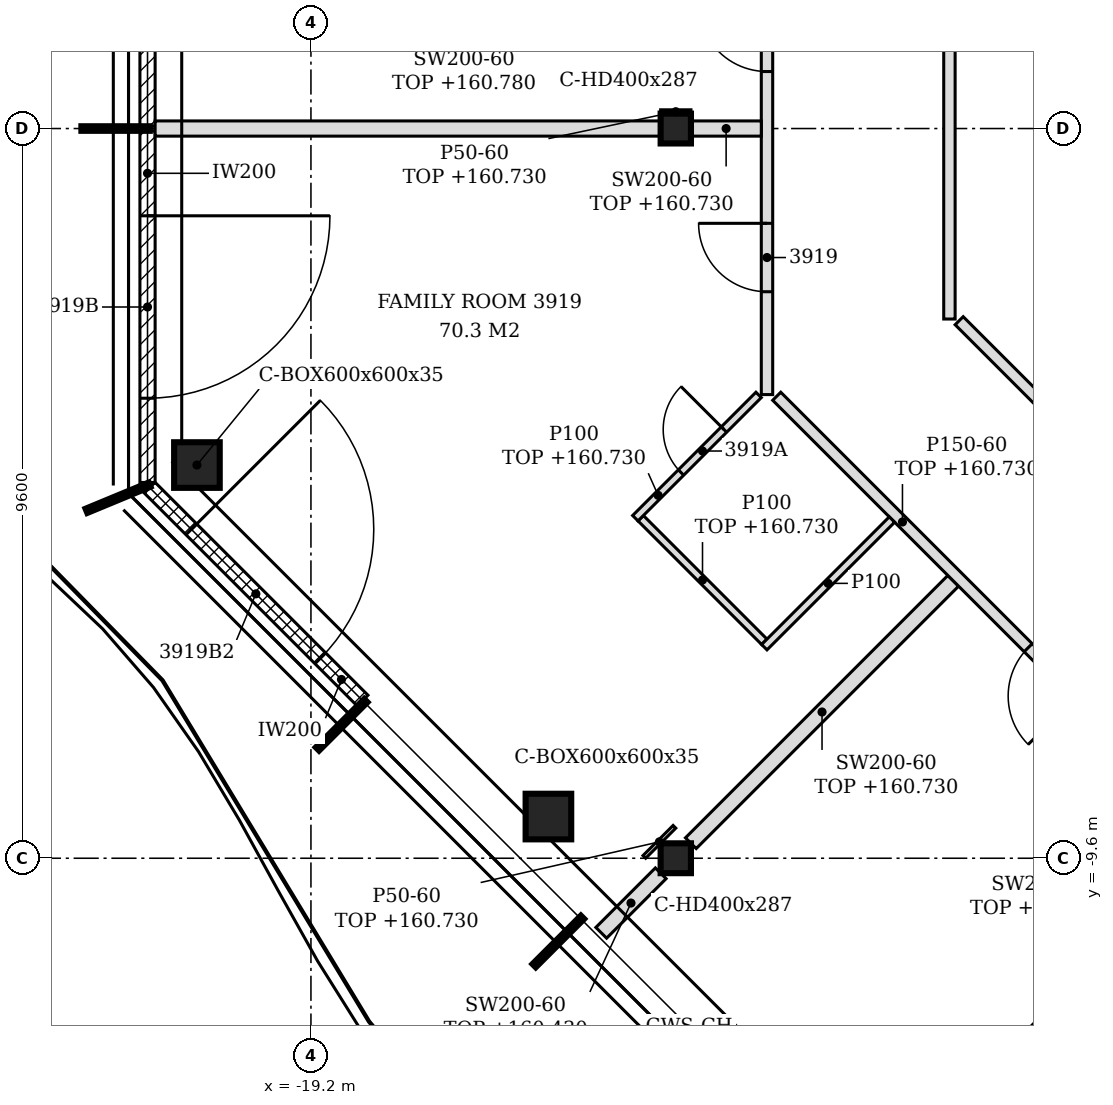
"""IFC4 building model, lengths in metres.
Left out: names, types, materials, properties, quantities, classifications, styles, units other than length and angle.
Written with IfcOpenShell. Run it as: python <this file> out.ifc"""

import sys

from ifc_helpers import new_model, si_unit, direction, frame, frame_2d, origin, origin_2d, place, context, subcontext, project, spatial, polyline, rectangle, hollow_rectangle, i_section, outline, extrude, element, fill, save


model = new_model("IFC4")
c1 = context("Model", 3, precision=1e-05, world=origin(), true_north=direction((0.0, 1.0)))
c2 = subcontext(c1, "Body", "Model", "MODEL_VIEW")
j1 = project(units=[si_unit("LENGTHUNIT", "METRE"), si_unit("PLANEANGLEUNIT", "RADIAN")], contexts=[c1])
p1 = place(None, origin())
s1 = spatial("IfcSite", under=j1, at=p1, CompositionType="ELEMENT")
p2 = place(p1, origin())
s2 = spatial("IfcBuilding", under=s1, at=p2, CompositionType="ELEMENT")
p3 = place(p2, frame((0.0, 0.0, 157.8)))
s3 = spatial("IfcBuildingStorey", under=s2, at=p3, CompositionType="ELEMENT", Elevation=157.8)
for number, where, z_axis, x_axis in (
    (1, (-20.7, -4.427, -0.15), (0.0, 0.0, 1.0), (1.0, 0.0, 0.0)),
    (2, (-16.076, -9.052, -0.15), (0.0, 0.0, 1.0), (1.0, 0.0, 0.0)),
):
    element("IfcColumn", number, at=place(p3, frame(where, z_axis=z_axis, x_axis=x_axis)), inside=s3, PredefinedType="COLUMN", context=c2, shape_type="SweptSolid", body=[
        extrude(hollow_rectangle(XDim=0.6, YDim=0.6, WallThickness=0.035, at=origin_2d()), origin(), (0.0, 0.0, 1.0), 3.6),
    ])
for number, where, z_axis, x_axis in (
    (3, (-14.4, -9.6, -0.15), (0.0, 0.0, 1.0), (1.0, 0.0, 0.0)),
    (4, (-14.4, 0.0, -0.15), (0.0, 0.0, 1.0), (1.0, 0.0, 0.0)),
):
    element("IfcColumn", number, at=place(p3, frame(where, z_axis=z_axis, x_axis=x_axis)), inside=s3, PredefinedType="COLUMN", context=c2, shape_type="SweptSolid", body=[
        extrude(i_section(OverallWidth=0.399, OverallDepth=0.393, WebThickness=0.023, FlangeThickness=0.037, FilletRadius=0.015, at=origin_2d()), origin(), (0.0, 0.0, 1.0), 3.6),
    ])
p4 = place(p3, frame((-21.35, 4.77, 0.0), z_axis=(0.0, 0.0, 1.0), x_axis=(0.0, -1.0, 0.0)))
e5 = element("IfcWall", 5, at=p4, inside=s3, PredefinedType="NOTDEFINED", context=c2, shape_type="SweptSolid", body=[
    extrude(rectangle(XDim=4.74, YDim=0.2, at=frame_2d((2.37, 0.0))), origin(), (0.0, 0.0, 1.0), 3.45),
])
p5 = place(p4, frame((1.17, 0.0, 0.0)))
e6 = element("IfcOpeningElement", 6, at=p5, cuts=e5, PredefinedType="OPENING", context=c2, shape_type="SweptSolid", body=[
    extrude(rectangle(XDim=2.4, YDim=2.4, at=frame_2d((1.2, 1.2))), frame((0.0, 0.11, 0.0), z_axis=(0.0, -1.0, 0.0), x_axis=(1.0, 0.0, 0.0)), (0.0, 0.0, 1.0), 0.22),
])
p6 = place(p3, frame((-21.35, -0.03, 0.0), z_axis=(0.0, 0.0, 1.0), x_axis=(0.0, -1.0, 0.0)))
e7 = element("IfcWall", 7, at=p6, inside=s3, PredefinedType="NOTDEFINED", context=c2, shape_type="SweptSolid", body=[
    extrude(rectangle(XDim=4.626, YDim=0.2, at=frame_2d((2.313, 0.0))), origin(), (0.0, 0.0, 1.0), 3.45),
])
p7 = place(p6, frame((1.118, 0.0, 0.0)))
e8 = element("IfcOpeningElement", 8, at=p7, cuts=e7, PredefinedType="OPENING", context=c2, shape_type="SweptSolid", body=[
    extrude(rectangle(XDim=2.4, YDim=2.4, at=frame_2d((1.2, 1.2))), frame((0.0, 0.11, 0.0), z_axis=(0.0, -1.0, 0.0), x_axis=(1.0, 0.0, 0.0)), (0.0, 0.0, 1.0), 0.22),
])
p8 = place(p3, frame((-21.322, -4.725, 0.0), z_axis=(0.0, 0.0, 1.0), x_axis=(0.707106781187, -0.707106781187, 0.0)))
e9 = element("IfcWall", 9, at=p8, inside=s3, PredefinedType="NOTDEFINED", context=c2, shape_type="SweptSolid", body=[
    extrude(rectangle(XDim=3.962, YDim=0.2, at=frame_2d((1.981, 0.0))), origin(), (0.0, 0.0, 1.0), 3.45),
])
p9 = place(p8, frame((0.775, 0.0, 0.0)))
e10 = element("IfcOpeningElement", 10, at=p9, cuts=e9, PredefinedType="OPENING", context=c2, shape_type="SweptSolid", body=[
    extrude(rectangle(XDim=2.4, YDim=2.4, at=frame_2d((1.2, 1.2))), frame((0.0, 0.11, 0.0), z_axis=(0.0, -1.0, 0.0), x_axis=(1.0, 0.0, 0.0)), (0.0, 0.0, 1.0), 0.22),
])
p10 = place(p3, frame((-11.152, -13.375, 0.0), z_axis=(0.0, 0.0, 1.0), x_axis=(0.707106781187, 0.707106781187, 0.0)))
e11 = element("IfcWall", 11, at=p10, inside=s3, PredefinedType="PARTITIONING", context=c2, shape_type="SweptSolid", body=[
    extrude(rectangle(XDim=6.83, YDim=0.2, at=frame_2d((3.415, 0.0))), origin(), (0.0, 0.0, 1.0), 2.93),
])
p11 = place(p3, frame((-15.381, -10.581, 0.0), z_axis=(0.0, 0.0, 1.0), x_axis=(0.707217034054, 0.706996511125, 0.0)))
e12 = element("IfcWall", 12, at=p11, inside=s3, PredefinedType="PARTITIONING", context=c2, shape_type="SweptSolid", body=[
    extrude(rectangle(XDim=1.107, YDim=0.2, at=frame_2d((0.554, 0.0))), origin(), (0.0, 0.0, 1.0), 2.63),
])
p12 = place(p3, frame((-14.202, -9.402, 0.0), z_axis=(0.0, 0.0, 1.0), x_axis=(0.707081776084, 0.707131785404, 0.0)))
e13 = element("IfcWall", 13, at=p12, inside=s3, PredefinedType="PARTITIONING", context=c2, shape_type="SweptSolid", body=[
    extrude(rectangle(XDim=4.882, YDim=0.2, at=frame_2d((2.441, 0.0))), origin(), (0.0, 0.0, 1.0), 2.93),
])
p13 = place(p3, frame((-8.322, -8.272, 0.0), z_axis=(0.0, 0.0, 1.0), x_axis=(-0.707106781187, 0.707106781187, 0.0)))
e14 = element("IfcWall", 14, at=p13, inside=s3, PredefinedType="PARTITIONING", context=c2, shape_type="SweptSolid", body=[
    extrude(rectangle(XDim=6.718, YDim=0.15, at=frame_2d((3.359, 0.0))), origin(), (0.0, 0.0, 1.0), 2.93),
])
p14 = place(p13, frame((1.139, 0.0, 0.0)))
e15 = element("IfcOpeningElement", 15, at=p14, cuts=e14, PredefinedType="OPENING", context=c2, shape_type="SweptSolid", body=[
    extrude(rectangle(XDim=0.9, YDim=2.1, at=frame_2d((0.45, 1.05))), frame((0.0, 0.085, 0.0), z_axis=(0.0, -1.0, 0.0), x_axis=(1.0, 0.0, 0.0)), (0.0, 0.0, 1.0), 0.17),
])
p15 = place(p3, frame((-13.235, -6.753, 0.0), z_axis=(0.0, 0.0, 1.0), x_axis=(-0.707106781187, 0.707106781187, 0.0)))
e16 = element("IfcWall", 16, at=p15, inside=s3, PredefinedType="PARTITIONING", context=c2, shape_type="SweptSolid", body=[
    extrude(rectangle(XDim=2.3, YDim=0.1, at=frame_2d((1.15, 0.0))), origin(), (0.0, 0.0, 1.0), 2.93),
])
p16 = place(p3, frame((-13.235, -6.823, 0.0), z_axis=(0.0, 0.0, 1.0), x_axis=(0.707106781187, 0.707106781187, 0.0)))
e17 = element("IfcWall", 17, at=p16, inside=s3, PredefinedType="PARTITIONING", context=c2, shape_type="SweptSolid", body=[
    extrude(rectangle(XDim=2.375, YDim=0.1, at=frame_2d((1.188, 0.0))), origin(), (0.0, 0.0, 1.0), 3.45),
])
p17 = place(p3, frame((-7.328, -5.872, 0.0), z_axis=(0.0, 0.0, 1.0), x_axis=(-0.707106781187, 0.707106781187, 0.0)))
e18 = element("IfcWall", 18, at=p17, inside=s3, PredefinedType="PARTITIONING", context=c2, shape_type="SweptSolid", body=[
    extrude(rectangle(XDim=4.729, YDim=0.15, at=frame_2d((2.365, 0.0))), origin(), (0.0, 0.0, 1.0), 2.93),
])
p18 = place(p3, frame((-14.932, -5.126, 0.0), z_axis=(0.0, 0.0, 1.0), x_axis=(0.707106781187, 0.707106781187, 0.0)))
e19 = element("IfcWall", 19, at=p18, inside=s3, PredefinedType="PARTITIONING", context=c2, shape_type="SweptSolid", body=[
    extrude(rectangle(XDim=2.294, YDim=0.1, at=frame_2d((1.147, 0.0))), origin(), (0.0, 0.0, 1.0), 2.93),
])
p19 = place(p18, frame((0.85, 0.0, 0.0)))
e20 = element("IfcOpeningElement", 20, at=p19, cuts=e19, PredefinedType="OPENING", context=c2, shape_type="SweptSolid", body=[
    extrude(rectangle(XDim=0.8, YDim=2.1, at=frame_2d((0.4, 1.05))), frame((0.0, 0.06, 0.0), z_axis=(0.0, -1.0, 0.0), x_axis=(1.0, 0.0, 0.0)), (0.0, 0.0, 1.0), 0.12),
])
p20 = place(p3, frame((-13.2, -3.5, 0.0), z_axis=(0.0, 0.0, 1.0), x_axis=(0.0, 1.0, 0.0)))
e21 = element("IfcWall", 21, at=p20, inside=s3, PredefinedType="PARTITIONING", context=c2, shape_type="SweptSolid", body=[
    extrude(outline(polyline([(0.0, 0.0), (17.634, 0.0), (17.634, 3.45), (13.2, 3.45), (13.198, 2.93), (13.0, 2.93), (12.998, 3.45), (8.4, 3.45), (8.398, 2.93), (8.2, 2.93), (8.198, 3.45), (3.6, 3.45), (3.598, 2.93), (3.4, 2.93), (3.398, 3.45), (0.0, 3.45), (0.0, 0.0)])), frame((0.0, 0.075, 0.0), z_axis=(0.0, -1.0, 0.0), x_axis=(1.0, 0.0, 0.0)), (0.0, 0.0, 1.0), 0.15),
])
p21 = place(p20, frame((15.784, 0.0, 0.0)))
e22 = element("IfcOpeningElement", 22, at=p21, cuts=e21, PredefinedType="OPENING", context=c2, shape_type="SweptSolid", body=[
    extrude(rectangle(XDim=0.9, YDim=2.1, at=frame_2d((0.45, 1.05))), frame((0.0, 0.085, 0.0), z_axis=(0.0, -1.0, 0.0), x_axis=(1.0, 0.0, 0.0)), (0.0, 0.0, 1.0), 0.17),
])
p22 = place(p20, frame((11.45, 0.0, 0.0)))
e23 = element("IfcOpeningElement", 23, at=p22, cuts=e21, PredefinedType="OPENING", context=c2, shape_type="SweptSolid", body=[
    extrude(rectangle(XDim=0.9, YDim=2.1, at=frame_2d((0.45, 1.05))), frame((0.0, 0.085, 0.0), z_axis=(0.0, -1.0, 0.0), x_axis=(1.0, 0.0, 0.0)), (0.0, 0.0, 1.0), 0.17),
])
p23 = place(p20, frame((4.25, 0.0, 0.0)))
e24 = element("IfcOpeningElement", 24, at=p23, cuts=e21, PredefinedType="OPENING", context=c2, shape_type="SweptSolid", body=[
    extrude(rectangle(XDim=0.9, YDim=2.1, at=frame_2d((0.45, 1.05))), frame((0.0, 0.085, 0.0), z_axis=(0.0, -1.0, 0.0), x_axis=(1.0, 0.0, 0.0)), (0.0, 0.0, 1.0), 0.17),
])
p24 = place(p20, frame((1.353, 0.0, 0.0)))
e25 = element("IfcOpeningElement", 25, at=p24, cuts=e21, PredefinedType="OPENING", context=c2, shape_type="SweptSolid", body=[
    extrude(rectangle(XDim=0.9, YDim=2.1, at=frame_2d((0.45, 1.05))), frame((0.0, 0.085, 0.0), z_axis=(0.0, -1.0, 0.0), x_axis=(1.0, 0.0, 0.0)), (0.0, 0.0, 1.0), 0.17),
])
p25 = place(p3, frame((-10.8, -2.506, 0.0), z_axis=(0.0, 0.0, 1.0), x_axis=(0.0, 1.0, 0.0)))
e26 = element("IfcWall", 26, at=p25, inside=s3, PredefinedType="PARTITIONING", context=c2, shape_type="SweptSolid", body=[
    extrude(outline(polyline([(0.0, 0.0), (15.631, 0.0), (15.631, 3.45), (12.206, 3.45), (12.204, 2.93), (12.006, 2.93), (12.004, 3.45), (7.406, 3.45), (7.404, 2.93), (7.206, 2.93), (7.204, 3.45), (2.606, 3.45), (2.604, 2.93), (2.406, 2.93), (2.404, 3.45), (0.0, 3.45), (0.0, 0.0)])), frame((0.0, 0.075, 0.0), z_axis=(0.0, -1.0, 0.0), x_axis=(1.0, 0.0, 0.0)), (0.0, 0.0, 1.0), 0.15),
])
p26 = place(p3, frame((-21.25, 0.0, 0.0), z_axis=(0.0, 0.0, 1.0), x_axis=(1.0, 0.0, 0.0)))
e27 = element("IfcWall", 27, at=p26, inside=s3, PredefinedType="PARTITIONING", context=c2, shape_type="SweptSolid", body=[
    extrude(outline(polyline([(0.0, 0.0), (6.65, 0.0), (6.65, 2.98), (0.7, 2.98), (0.698, 2.93), (0.4, 2.93), (0.398, 2.98), (0.0, 2.98), (0.0, 0.0)])), frame((0.0, 0.1, 0.0), z_axis=(0.0, -1.0, 0.0), x_axis=(1.0, 0.0, 0.0)), (0.0, 0.0, 1.0), 0.2),
])
p27 = place(p3, frame((-14.2, 0.0, 0.0), z_axis=(0.0, 0.0, 1.0), x_axis=(1.0, 0.0, 0.0)))
e28 = element("IfcWall", 28, at=p27, inside=s3, PredefinedType="PARTITIONING", context=c2, shape_type="SweptSolid", body=[
    extrude(rectangle(XDim=0.926, YDim=0.2, at=frame_2d((0.463, 0.0))), origin(), (0.0, 0.0, 1.0), 2.93),
])
p28 = place(p3, frame((-14.814, -9.582, 0.0), z_axis=(0.0, 0.0, 1.0), x_axis=(0.707106781187, 0.707106781187, 0.0)))
e29 = element("IfcWall", 29, at=p28, inside=s3, PredefinedType="PARTITIONING", context=c2, shape_type="SweptSolid", body=[
    extrude(rectangle(XDim=0.56, YDim=0.05, at=frame_2d((0.28, 0.0))), origin(), (0.0, 0.0, 1.0), 2.93),
])
p29 = place(p3, frame((-14.6, 0.221, 0.0), z_axis=(0.0, 0.0, 1.0), x_axis=(1.0, 0.0, 0.0)))
e30 = element("IfcWall", 30, at=p29, inside=s3, PredefinedType="PARTITIONING", context=c2, shape_type="SweptSolid", body=[
    extrude(rectangle(XDim=0.399, YDim=0.05, at=frame_2d((0.2, 0.0))), origin(), (0.0, 0.0, 1.0), 2.93),
])
p30 = place(p7, origin())
e31 = element("IfcDoor", 31, at=p30, inside=s3, OperationType="SINGLE_SWING_LEFT", PredefinedType="DOOR", context=c2, shape_type="SweptSolid", body=[
    extrude(rectangle(XDim=2.4, YDim=2.4, at=frame_2d((1.2, 1.2))), frame((0.0, 0.025, 0.0), z_axis=(0.0, -1.0, 0.0), x_axis=(1.0, 0.0, 0.0)), (0.0, 0.0, 1.0), 0.05),
])
fill(e8, e31)
p31 = place(p9, origin())
e32 = element("IfcDoor", 32, at=p31, inside=s3, OperationType="SINGLE_SWING_LEFT", PredefinedType="DOOR", context=c2, shape_type="SweptSolid", body=[
    extrude(rectangle(XDim=2.4, YDim=2.4, at=frame_2d((1.2, 1.2))), frame((0.0, 0.025, 0.0), z_axis=(0.0, -1.0, 0.0), x_axis=(1.0, 0.0, 0.0)), (0.0, 0.0, 1.0), 0.05),
])
fill(e10, e32)
p32 = place(p23, origin())
e33 = element("IfcDoor", 33, at=p32, inside=s3, OperationType="SINGLE_SWING_RIGHT", PredefinedType="DOOR", context=c2, shape_type="SweptSolid", body=[
    extrude(rectangle(XDim=0.9, YDim=2.1, at=frame_2d((0.45, 1.05))), frame((0.0, 0.025, 0.0), z_axis=(0.0, -1.0, 0.0), x_axis=(1.0, 0.0, 0.0)), (0.0, 0.0, 1.0), 0.05),
])
fill(e24, e33)
p33 = place(p24, origin())
e34 = element("IfcDoor", 34, at=p33, inside=s3, OperationType="SINGLE_SWING_RIGHT", PredefinedType="DOOR", context=c2, shape_type="SweptSolid", body=[
    extrude(rectangle(XDim=0.9, YDim=2.1, at=frame_2d((0.45, 1.05))), frame((0.0, 0.025, 0.0), z_axis=(0.0, -1.0, 0.0), x_axis=(1.0, 0.0, 0.0)), (0.0, 0.0, 1.0), 0.05),
])
fill(e25, e34)
p34 = place(p19, origin())
e35 = element("IfcDoor", 35, at=p34, inside=s3, OperationType="SINGLE_SWING_RIGHT", PredefinedType="DOOR", context=c2, shape_type="SweptSolid", body=[
    extrude(rectangle(XDim=0.8, YDim=2.1, at=frame_2d((0.4, 1.05))), frame((0.0, 0.025, 0.0), z_axis=(0.0, -1.0, 0.0), x_axis=(1.0, 0.0, 0.0)), (0.0, 0.0, 1.0), 0.05),
])
fill(e20, e35)
p35 = place(p14, origin())
e36 = element("IfcDoor", 36, at=p35, inside=s3, OperationType="SINGLE_SWING_LEFT", PredefinedType="DOOR", context=c2, shape_type="SweptSolid", body=[
    extrude(rectangle(XDim=0.9, YDim=2.1, at=frame_2d((0.45, 1.05))), frame((0.0, 0.025, 0.0), z_axis=(0.0, -1.0, 0.0), x_axis=(1.0, 0.0, 0.0)), (0.0, 0.0, 1.0), 0.05),
])
fill(e15, e36)
save(model, sys.argv[1])
